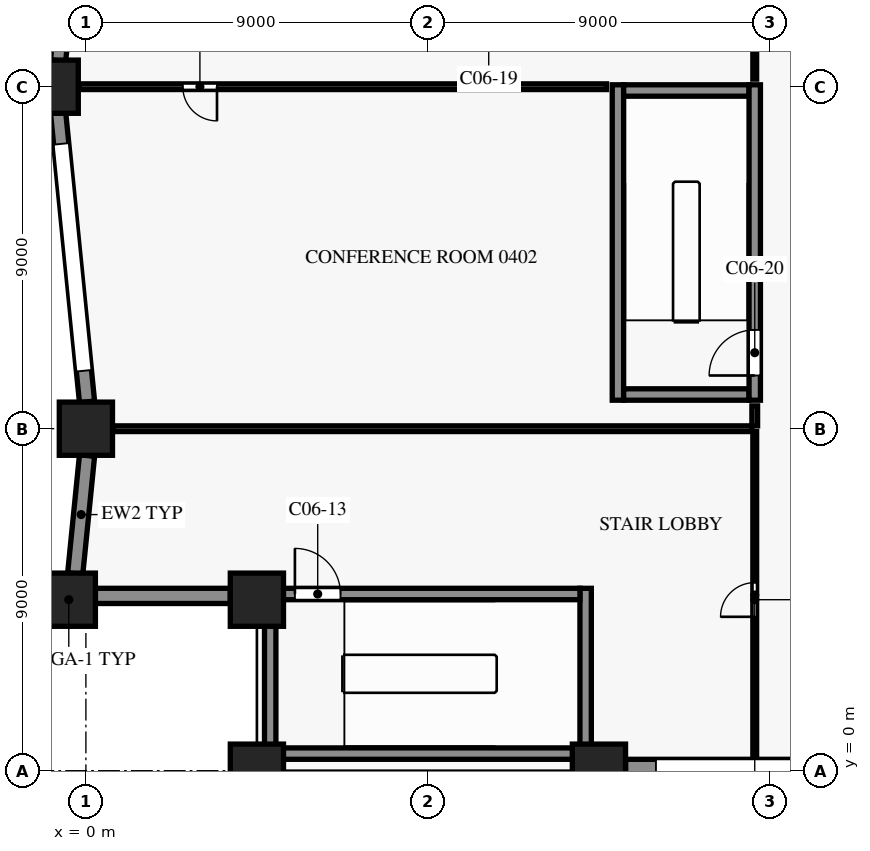
"""IFC4 building model, lengths in metres.
Left out: names, types, materials, properties, quantities, classifications, styles, units other than length and angle.
Written with IfcOpenShell. Run it as: python <this file> out.ifc"""

import sys

from ifc_helpers import new_model, si_unit, direction, frame, frame_2d, origin, origin_2d, place, context, subcontext, project, spatial, rectangle, extrude, element, fill, save


model = new_model("IFC4")
c1 = context("Model", 3, precision=1e-05, world=origin(), true_north=direction((0.0, 1.0)))
c2 = subcontext(c1, "Body", "Model", "MODEL_VIEW")
j1 = project(units=[si_unit("LENGTHUNIT", "METRE"), si_unit("PLANEANGLEUNIT", "RADIAN")], contexts=[c1])
p1 = place(None, origin())
s1 = spatial("IfcSite", under=j1, at=p1, CompositionType="ELEMENT")
p2 = place(p1, origin())
s2 = spatial("IfcBuilding", under=s1, at=p2, CompositionType="ELEMENT")
p3 = place(p2, frame((0.0, 0.0, 27.5)))
s3 = spatial("IfcBuildingStorey", under=s2, at=p3, CompositionType="ELEMENT", Elevation=27.5)
for number, where, z_axis, x_axis in (
    (1, (4.5, 0.0, 0.0), (0.0, 0.0, 1.0), (1.0, 0.0, 0.0)),
    (2, (13.5, 0.0, 0.0), (0.0, 0.0, 1.0), (1.0, 0.0, 0.0)),
    (3, (-0.9, 18.0, 0.0), (0.0, 0.0, 1.0), (1.0, 0.0, 0.0)),
    (4, (0.0, 9.0, 0.0), (0.0, 0.0, 1.0), (1.0, 0.0, 0.0)),
    (5, (-0.45, 4.5, 0.0), (0.0, 0.0, 1.0), (1.0, 0.0, 0.0)),
    (6, (4.5, 4.5, 0.0), (0.0, 0.0, 1.0), (1.0, 0.0, 0.0)),
):
    element("IfcColumn", number, at=place(p3, frame(where, z_axis=z_axis, x_axis=x_axis)), inside=s3, PredefinedType="COLUMN", context=c2, shape_type="SweptSolid", body=[
        extrude(rectangle(XDim=1.4, YDim=1.4, at=origin_2d()), origin(), (0.0, 0.0, 1.0), 4.5),
    ])
p4 = place(p3, frame((21.8, 0.1, 0.0), z_axis=(0.0, 0.0, 1.0), x_axis=(-1.0, 0.0, 0.0)))
e7 = element("IfcWall", 7, at=p4, inside=s3, PredefinedType="SOLIDWALL", context=c2, shape_type="SweptSolid", body=[
    extrude(rectangle(XDim=7.6, YDim=0.4, at=frame_2d((3.8, 0.0))), origin(), (0.0, 0.0, 1.0), 3.6),
])
p5 = place(p4, frame((0.8, 0.0, 0.9)))
e8 = element("IfcOpeningElement", 8, at=p5, cuts=e7, PredefinedType="OPENING", context=c2, shape_type="SweptSolid", body=[
    extrude(rectangle(XDim=6.0, YDim=1.8, at=frame_2d((3.0, 0.9))), frame((0.0, 0.21, 0.0), z_axis=(0.0, -1.0, 0.0), x_axis=(1.0, 0.0, 0.0)), (0.0, 0.0, 1.0), 0.42),
])
p6 = place(p3, frame((-0.731, 18.687, 0.0), z_axis=(0.0, 0.0, 1.0), x_axis=(0.099478423711, 0.995039719416, 0.0)))
e9 = element("IfcWall", 9, at=p6, inside=s3, PredefinedType="SOLIDWALL", context=c2, shape_type="SweptSolid", body=[
    extrude(rectangle(XDim=7.645, YDim=0.4, at=frame_2d((3.822, 0.0))), origin(), (0.0, 0.0, 1.0), 3.6),
])
p7 = place(p6, frame((0.823, 0.0, 0.9)))
e10 = element("IfcOpeningElement", 10, at=p7, cuts=e9, PredefinedType="OPENING", context=c2, shape_type="SweptSolid", body=[
    extrude(rectangle(XDim=6.0, YDim=1.8, at=frame_2d((3.0, 0.9))), frame((0.0, 0.21, 0.0), z_axis=(0.0, -1.0, 0.0), x_axis=(1.0, 0.0, 0.0)), (0.0, 0.0, 1.0), 0.42),
])
p8 = place(p3, frame((0.03, 9.707, 0.0), z_axis=(0.0, 0.0, 1.0), x_axis=(-0.099478423711, 0.995039719416, 0.0)))
e11 = element("IfcWall", 11, at=p8, inside=s3, PredefinedType="SOLIDWALL", context=c2, shape_type="SweptSolid", body=[
    extrude(rectangle(XDim=7.645, YDim=0.4, at=frame_2d((3.822, 0.0))), origin(), (0.0, 0.0, 1.0), 3.6),
])
p9 = place(p8, frame((0.823, 0.0, 0.9)))
e12 = element("IfcOpeningElement", 12, at=p9, cuts=e11, PredefinedType="OPENING", context=c2, shape_type="SweptSolid", body=[
    extrude(rectangle(XDim=6.0, YDim=1.8, at=frame_2d((3.0, 0.9))), frame((0.0, 0.21, 0.0), z_axis=(0.0, -1.0, 0.0), x_axis=(1.0, 0.0, 0.0)), (0.0, 0.0, 1.0), 0.42),
])
p10 = place(p3, frame((-0.281, 5.187, 0.0), z_axis=(0.0, 0.0, 1.0), x_axis=(0.099457269599, 0.995041834057, 0.0)))
e13 = element("IfcWall", 13, at=p10, inside=s3, PredefinedType="SOLIDWALL", context=c2, shape_type="SweptSolid", body=[
    extrude(rectangle(XDim=3.122, YDim=0.4, at=frame_2d((1.561, 0.0))), origin(), (0.0, 0.0, 1.0), 3.6),
])
p11 = place(p3, frame((3.8, 4.6, 0.0), z_axis=(0.0, 0.0, 1.0), x_axis=(-1.0, 0.0, 0.0)))
e14 = element("IfcWall", 14, at=p11, inside=s3, PredefinedType="SOLIDWALL", context=c2, shape_type="SweptSolid", body=[
    extrude(rectangle(XDim=3.55, YDim=0.4, at=frame_2d((1.775, 0.0))), origin(), (0.0, 0.0, 1.0), 3.6),
])
p12 = place(p3, frame((5.0, 0.45, 0.0), z_axis=(0.0, 0.0, 1.0), x_axis=(1.0, 0.0, 0.0)))
e15 = element("IfcWall", 15, at=p12, inside=s3, PredefinedType="SHEAR", context=c2, shape_type="SweptSolid", body=[
    extrude(rectangle(XDim=8.0, YDim=0.3, at=frame_2d((4.0, 0.0))), origin(), (0.0, 0.0, 1.0), 4.2),
])
p13 = place(p3, frame((5.0, 4.65, 0.0), z_axis=(0.0, 0.0, 1.0), x_axis=(1.0, 0.0, 0.0)))
e16 = element("IfcWall", 16, at=p13, inside=s3, PredefinedType="SHEAR", context=c2, shape_type="SweptSolid", body=[
    extrude(rectangle(XDim=8.0, YDim=0.3, at=frame_2d((4.0, 0.0))), origin(), (0.0, 0.0, 1.0), 4.2),
])
p14 = place(p13, frame((0.5, 0.0, 0.0)))
e17 = element("IfcOpeningElement", 17, at=p14, cuts=e16, PredefinedType="OPENING", context=c2, shape_type="SweptSolid", body=[
    extrude(rectangle(XDim=1.2, YDim=2.2, at=frame_2d((0.6, 1.1))), frame((0.0, 0.16, 0.0), z_axis=(0.0, -1.0, 0.0), x_axis=(1.0, 0.0, 0.0)), (0.0, 0.0, 1.0), 0.32),
])
for number, where, z_axis, x_axis in (
    (18, (14.15, 9.9, 0.0), (0.0, 0.0, 1.0), (1.0, 0.0, 0.0)),
    (19, (14.15, 17.9, 0.0), (0.0, 0.0, 1.0), (1.0, 0.0, 0.0)),
):
    element("IfcWall", number, at=place(p3, frame(where, z_axis=z_axis, x_axis=x_axis)), inside=s3, PredefinedType="SHEAR", context=c2, shape_type="SweptSolid", body=[
        extrude(rectangle(XDim=3.3, YDim=0.3, at=frame_2d((1.65, 0.0))), origin(), (0.0, 0.0, 1.0), 4.2),
    ])
for number, where, z_axis, x_axis in (
    (20, (4.85, 0.3, 0.0), (0.0, 0.0, 1.0), (0.0, 1.0, 0.0)),
    (21, (13.15, 0.3, 0.0), (0.0, 0.0, 1.0), (0.0, 1.0, 0.0)),
):
    element("IfcWall", number, at=place(p3, frame(where, z_axis=z_axis, x_axis=x_axis)), inside=s3, PredefinedType="SHEAR", context=c2, shape_type="SweptSolid", body=[
        extrude(rectangle(XDim=4.5, YDim=0.3, at=frame_2d((2.25, 0.0))), origin(), (0.0, 0.0, 1.0), 4.2),
    ])
p15 = place(p3, frame((14.0, 9.75, 0.0), z_axis=(0.0, 0.0, 1.0), x_axis=(0.0, 1.0, 0.0)))
e22 = element("IfcWall", 22, at=p15, inside=s3, PredefinedType="SHEAR", context=c2, shape_type="SweptSolid", body=[
    extrude(rectangle(XDim=8.3, YDim=0.3, at=frame_2d((4.15, 0.0))), origin(), (0.0, 0.0, 1.0), 4.2),
])
p16 = place(p3, frame((17.6, 9.75, 0.0), z_axis=(0.0, 0.0, 1.0), x_axis=(0.0, 1.0, 0.0)))
e23 = element("IfcWall", 23, at=p16, inside=s3, PredefinedType="SHEAR", context=c2, shape_type="SweptSolid", body=[
    extrude(rectangle(XDim=8.3, YDim=0.3, at=frame_2d((4.15, 0.0))), origin(), (0.0, 0.0, 1.0), 4.2),
])
p17 = place(p16, frame((0.65, 0.0, 0.0)))
e24 = element("IfcOpeningElement", 24, at=p17, cuts=e23, PredefinedType="OPENING", context=c2, shape_type="SweptSolid", body=[
    extrude(rectangle(XDim=1.2, YDim=2.2, at=frame_2d((0.6, 1.1))), frame((0.0, 0.16, 0.0), z_axis=(0.0, -1.0, 0.0), x_axis=(1.0, 0.0, 0.0)), (0.0, 0.0, 1.0), 0.32),
])
p18 = place(p3, frame((17.6, 0.32, 0.0), z_axis=(0.0, 0.0, 1.0), x_axis=(0.0, 1.0, 0.0)))
e25 = element("IfcWall", 25, at=p18, inside=s3, PredefinedType="PARTITIONING", context=c2, shape_type="SweptSolid", body=[
    extrude(rectangle(XDim=8.605, YDim=0.1, at=frame_2d((4.302, 0.0))), origin(), (0.0, 0.0, 1.0), 3.33),
])
p19 = place(p18, frame((3.73, 0.0, 0.0)))
e26 = element("IfcOpeningElement", 26, at=p19, cuts=e25, PredefinedType="OPENING", context=c2, shape_type="SweptSolid", body=[
    extrude(rectangle(XDim=0.9, YDim=2.1, at=frame_2d((0.45, 1.05))), frame((0.0, 0.06, 0.0), z_axis=(0.0, -1.0, 0.0), x_axis=(1.0, 0.0, 0.0)), (0.0, 0.0, 1.0), 0.12),
])
p20 = place(p3, frame((0.72, 9.0, 0.0), z_axis=(0.0, 0.0, 1.0), x_axis=(1.0, 0.0, 0.0)))
e27 = element("IfcWall", 27, at=p20, inside=s3, PredefinedType="PARTITIONING", context=c2, shape_type="SweptSolid", body=[
    extrude(rectangle(XDim=16.805, YDim=0.15, at=frame_2d((8.402, 0.0))), origin(), (0.0, 0.0, 1.0), 3.33),
])
p21 = place(p3, frame((17.6, 9.075, 0.0), z_axis=(0.0, 0.0, 1.0), x_axis=(0.0, 1.0, 0.0)))
e28 = element("IfcWall", 28, at=p21, inside=s3, PredefinedType="PARTITIONING", context=c2, shape_type="SweptSolid", body=[
    extrude(rectangle(XDim=0.525, YDim=0.15, at=frame_2d((0.263, 0.0))), origin(), (0.0, 0.0, 1.0), 3.33),
])
p22 = place(p3, frame((13.7, 18.0, 0.0), z_axis=(0.0, 0.0, 1.0), x_axis=(-1.0, 0.0, 0.0)))
e29 = element("IfcWall", 29, at=p22, inside=s3, PredefinedType="PARTITIONING", context=c2, shape_type="SweptSolid", body=[
    extrude(rectangle(XDim=13.88, YDim=0.15, at=frame_2d((6.94, 0.0))), origin(), (0.0, 0.0, 1.0), 3.33),
])
p23 = place(p22, frame((10.25, 0.0, 0.0)))
e30 = element("IfcOpeningElement", 30, at=p23, cuts=e29, PredefinedType="OPENING", context=c2, shape_type="SweptSolid", body=[
    extrude(rectangle(XDim=0.9, YDim=2.1, at=frame_2d((0.45, 1.05))), frame((0.0, 0.085, 0.0), z_axis=(0.0, -1.0, 0.0), x_axis=(1.0, 0.0, 0.0)), (0.0, 0.0, 1.0), 0.17),
])
p24 = place(p3, frame((17.6, 18.2, 0.0), z_axis=(0.0, 0.0, 1.0), x_axis=(0.0, 1.0, 0.0)))
e31 = element("IfcWall", 31, at=p24, inside=s3, PredefinedType="PARTITIONING", context=c2, shape_type="SweptSolid", body=[
    extrude(rectangle(XDim=8.75, YDim=0.1, at=frame_2d((4.375, 0.0))), origin(), (0.0, 0.0, 1.0), 3.33),
])
p25 = place(p24, frame((3.35, 0.0, 0.0)))
e32 = element("IfcOpeningElement", 32, at=p25, cuts=e31, PredefinedType="OPENING", context=c2, shape_type="SweptSolid", body=[
    extrude(rectangle(XDim=0.9, YDim=2.1, at=frame_2d((0.45, 1.05))), frame((0.0, 0.06, 0.0), z_axis=(0.0, -1.0, 0.0), x_axis=(1.0, 0.0, 0.0)), (0.0, 0.0, 1.0), 0.12),
])
p26 = place(p5, origin())
e33 = element("IfcWindow", 33, at=p26, inside=s3, PartitioningType="SINGLE_PANEL", PredefinedType="WINDOW", context=c2, shape_type="SweptSolid", body=[
    extrude(rectangle(XDim=6.0, YDim=1.8, at=frame_2d((3.0, 0.9))), frame((0.0, 0.03, 0.0), z_axis=(0.0, -1.0, 0.0), x_axis=(1.0, 0.0, 0.0)), (0.0, 0.0, 1.0), 0.06),
])
fill(e8, e33)
p27 = place(p9, origin())
e34 = element("IfcWindow", 34, at=p27, inside=s3, PartitioningType="SINGLE_PANEL", PredefinedType="WINDOW", context=c2, shape_type="SweptSolid", body=[
    extrude(rectangle(XDim=6.0, YDim=1.8, at=frame_2d((3.0, 0.9))), frame((0.0, 0.03, 0.0), z_axis=(0.0, -1.0, 0.0), x_axis=(1.0, 0.0, 0.0)), (0.0, 0.0, 1.0), 0.06),
])
fill(e12, e34)
p28 = place(p14, origin())
e35 = element("IfcDoor", 35, at=p28, inside=s3, OperationType="SINGLE_SWING_LEFT", PredefinedType="DOOR", context=c2, shape_type="SweptSolid", body=[
    extrude(rectangle(XDim=1.2, YDim=2.2, at=frame_2d((0.6, 1.1))), frame((0.0, 0.025, 0.0), z_axis=(0.0, -1.0, 0.0), x_axis=(1.0, 0.0, 0.0)), (0.0, 0.0, 1.0), 0.05),
])
fill(e17, e35)
p29 = place(p17, origin())
e36 = element("IfcDoor", 36, at=p29, inside=s3, OperationType="SINGLE_SWING_LEFT", PredefinedType="DOOR", context=c2, shape_type="SweptSolid", body=[
    extrude(rectangle(XDim=1.2, YDim=2.2, at=frame_2d((0.6, 1.1))), frame((0.0, 0.025, 0.0), z_axis=(0.0, -1.0, 0.0), x_axis=(1.0, 0.0, 0.0)), (0.0, 0.0, 1.0), 0.05),
])
fill(e24, e36)
p30 = place(p19, origin())
e37 = element("IfcDoor", 37, at=p30, inside=s3, OperationType="SINGLE_SWING_LEFT", PredefinedType="DOOR", context=c2, shape_type="SweptSolid", body=[
    extrude(rectangle(XDim=0.9, YDim=2.1, at=frame_2d((0.45, 1.05))), frame((0.0, 0.025, 0.0), z_axis=(0.0, -1.0, 0.0), x_axis=(1.0, 0.0, 0.0)), (0.0, 0.0, 1.0), 0.05),
])
fill(e26, e37)
p31 = place(p23, origin())
e38 = element("IfcDoor", 38, at=p31, inside=s3, OperationType="SINGLE_SWING_RIGHT", PredefinedType="DOOR", context=c2, shape_type="SweptSolid", body=[
    extrude(rectangle(XDim=0.9, YDim=2.1, at=frame_2d((0.45, 1.05))), frame((0.0, 0.025, 0.0), z_axis=(0.0, -1.0, 0.0), x_axis=(1.0, 0.0, 0.0)), (0.0, 0.0, 1.0), 0.05),
])
fill(e30, e38)
save(model, sys.argv[1])
